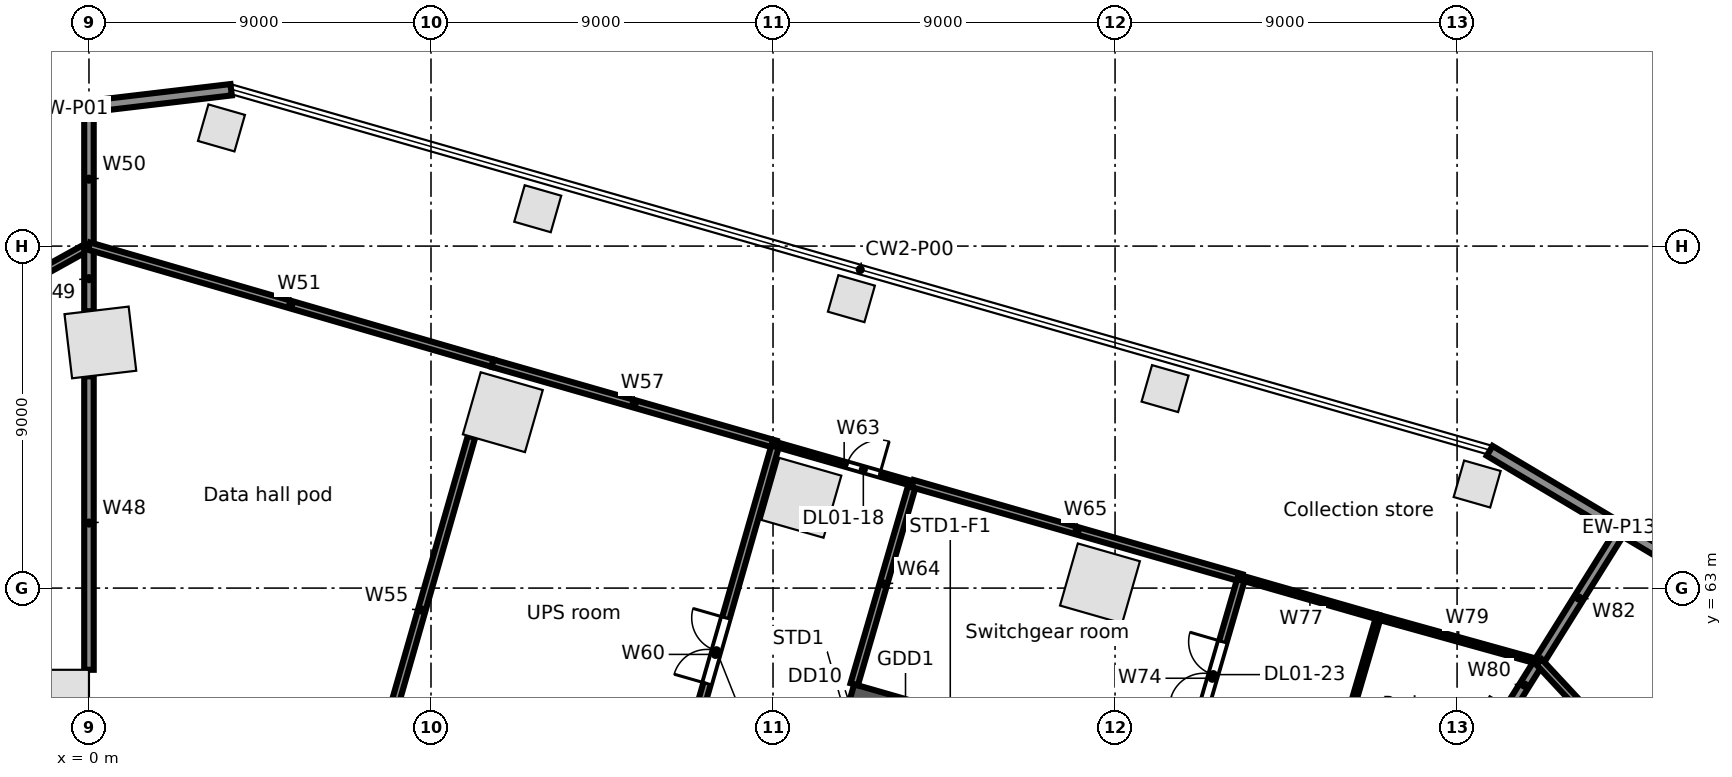
"""IFC4 building model, lengths in metres.
Left out: names, types, materials, properties, quantities, classifications, styles, units other than length and angle.
Written with IfcOpenShell. Run it as: python <this file> out.ifc"""

import sys

from ifc_helpers import new_model, si_unit, direction, frame, frame_2d, origin, origin_2d, place, context, subcontext, project, spatial, rectangle, extrude, element, fill, save


model = new_model("IFC4")
c1 = context("Model", 3, precision=1e-05, world=origin(), true_north=direction((0.0, 1.0)))
c2 = subcontext(c1, "Body", "Model", "MODEL_VIEW")
j1 = project(units=[si_unit("LENGTHUNIT", "METRE"), si_unit("PLANEANGLEUNIT", "RADIAN")], contexts=[c1])
p1 = place(None, origin())
s1 = spatial("IfcSite", under=j1, at=p1, CompositionType="ELEMENT")
p2 = place(p1, origin())
s2 = spatial("IfcBuilding", under=s1, at=p2, CompositionType="ELEMENT")
p3 = place(p2, frame((0.0, 0.0, 11.5)))
s3 = spatial("IfcBuildingStorey", under=s2, at=p3, CompositionType="ELEMENT", Elevation=11.5)
p4 = place(p3, frame((37.085, 59.262, 0.0), z_axis=(0.0, 0.0, 1.0), x_axis=(-0.859406411501, 0.511293086077, 0.0)))
e1 = element("IfcColumn", 1, at=p4, inside=s3, PredefinedType="COLUMN", context=c2, shape_type="SweptSolid", body=[
    extrude(rectangle(XDim=1.3, YDim=1.3, at=origin_2d()), origin(), (0.0, 0.0, 1.0), 5.0),
])
for number, where, z_axis, x_axis in (
    (2, (26.603, 63.124, 0.0), (0.0, 0.0, 1.0), (-0.961, 0.276, 0.0)),
    (3, (18.746, 65.376, 0.0), (0.0, 0.0, 1.0), (-0.961, 0.276, 0.0)),
    (4, (10.89, 67.629, 0.0), (0.0, 0.0, 1.0), (-0.961, 0.276, 0.0)),
    (5, (0.3, 69.464, 0.0), (0.0, 0.0, 1.0), (-0.993, -0.118, 0.0)),
    (6, (-0.85, 60.0, 0.0), (0.0, 0.0, 1.0), (0.0, 1.0, 0.0)),
):
    element("IfcColumn", number, at=place(p3, frame(where, z_axis=z_axis, x_axis=x_axis)), inside=s3, PredefinedType="COLUMN", context=c2, shape_type="SweptSolid", body=[
        extrude(rectangle(XDim=1.7, YDim=1.7, at=origin_2d()), origin(), (0.0, 0.0, 1.0), 5.0),
    ])
for number, where, z_axis, x_axis in (
    (7, (36.528, 65.739, 0.0), (0.0, 0.0, 1.0), (-0.961, 0.276, 0.0)),
    (8, (28.316, 68.25, 0.0), (0.0, 0.0, 1.0), (-0.961, 0.276, 0.0)),
    (9, (20.062, 70.616, 0.0), (0.0, 0.0, 1.0), (-0.961, 0.276, 0.0)),
    (10, (11.809, 72.983, 0.0), (0.0, 0.0, 1.0), (-0.961, 0.276, 0.0)),
    (11, (3.486, 75.11, 0.0), (0.0, 0.0, 1.0), (-0.961, 0.276, 0.0)),
):
    element("IfcColumn", number, at=place(p3, frame(where, z_axis=z_axis, x_axis=x_axis)), inside=s3, PredefinedType="COLUMN", context=c2, shape_type="SweptSolid", body=[
        extrude(rectangle(XDim=1.0, YDim=1.0, at=origin_2d()), origin(), (0.0, 0.0, 1.0), 5.0),
    ])
p5 = place(p3, frame((-4.663, 75.12, 0.0), z_axis=(0.0, 0.0, 1.0), x_axis=(0.993069631717, 0.11752747152, 0.0)))
e12 = element("IfcWall", 12, at=p5, inside=s3, PredefinedType="STANDARD", context=c2, shape_type="SweptSolid", body=[
    extrude(rectangle(XDim=8.463, YDim=0.3, at=frame_2d((4.231, 0.0))), origin(), (0.0, 0.0, 1.0), 4.65),
])
p6 = place(p3, frame((36.858, 66.612, 0.0), z_axis=(0.0, 0.0, 1.0), x_axis=(0.85940790562, -0.51129057468, 0.0)))
e13 = element("IfcWall", 13, at=p6, inside=s3, PredefinedType="STANDARD", context=c2, shape_type="SweptSolid", body=[
    extrude(rectangle(XDim=7.906, YDim=0.3, at=frame_2d((3.953, 0.0))), origin(), (0.0, 0.0, 1.0), 4.65),
])
p7 = place(p3, frame((20.053, 60.18, 0.0), z_axis=(0.0, 0.0, 1.0), x_axis=(0.96126248289, -0.275634611374, 0.0)))
e14 = element("IfcWall", 14, at=p7, inside=s3, PredefinedType="SOLIDWALL", context=c2, shape_type="SweptSolid", body=[
    extrude(rectangle(XDim=9.0, YDim=0.6, at=frame_2d((4.5, 0.0))), origin(), (0.0, 0.0, 1.0), 4.65),
])
p8 = place(p3, frame((-6.337, 68.478, 0.0), z_axis=(0.0, 0.0, 1.0), x_axis=(0.87407148623, 0.485797320864, 0.0)))
e15 = element("IfcWall", 15, at=p8, inside=s3, PredefinedType="PARTITIONING", context=c2, shape_type="SweptSolid", body=[
    extrude(rectangle(XDim=7.25, YDim=0.2, at=frame_2d((3.625, 0.0))), origin(), (0.0, 0.0, 1.0), 3.93),
])
p9 = place(p8, frame((2.7, 0.0, 0.0)))
e16 = element("IfcOpeningElement", 16, at=p9, cuts=e15, PredefinedType="OPENING", context=c2, shape_type="SweptSolid", body=[
    extrude(rectangle(XDim=1.8, YDim=2.1, at=frame_2d((0.9, 1.05))), frame((0.0, 0.11, 0.0), z_axis=(0.0, -1.0, 0.0), x_axis=(1.0, 0.0, 0.0)), (0.0, 0.0, 1.0), 0.22),
])
p10 = place(p3, frame((0.0, 60.85, 0.0), z_axis=(0.0, 0.0, 1.0), x_axis=(0.0, 1.0, 0.0)))
e17 = element("IfcWall", 17, at=p10, inside=s3, PredefinedType="PARTITIONING", context=c2, shape_type="SweptSolid", body=[
    extrude(rectangle(XDim=7.723, YDim=0.25, at=frame_2d((3.861, 0.0))), origin(), (0.0, 0.0, 1.0), 3.93),
])
p11 = place(p3, frame((0.0, 70.285, 0.0), z_axis=(0.0, 0.0, 1.0), x_axis=(0.0, 1.0, 0.0)))
e18 = element("IfcWall", 18, at=p11, inside=s3, PredefinedType="PARTITIONING", context=c2, shape_type="SweptSolid", body=[
    extrude(rectangle(XDim=1.715, YDim=0.25, at=frame_2d((0.857, 0.0))), origin(), (0.0, 0.0, 1.0), 4.65),
])
p12 = place(p3, frame((0.0, 72.0, 0.0), z_axis=(0.0, 0.0, 1.0), x_axis=(0.0, 1.0, 0.0)))
e19 = element("IfcWall", 19, at=p12, inside=s3, PredefinedType="PARTITIONING", context=c2, shape_type="SweptSolid", body=[
    extrude(rectangle(XDim=3.521, YDim=0.25, at=frame_2d((1.76, 0.0))), origin(), (0.0, 0.0, 1.0), 4.024),
])
p13 = place(p3, frame((0.0, 72.0, 0.0), z_axis=(0.0, 0.0, 1.0), x_axis=(0.960375968852, -0.278707729443, 0.0)))
e20 = element("IfcWall", 20, at=p13, inside=s3, PredefinedType="PARTITIONING", context=c2, shape_type="SweptSolid", body=[
    extrude(rectangle(XDim=11.058, YDim=0.2, at=frame_2d((5.529, 0.0))), origin(), (0.0, 0.0, 1.0), 3.712),
])
p14 = place(p3, frame((7.45, 57.864, 0.0), z_axis=(0.0, 0.0, 1.0), x_axis=(0.275710305557, 0.961240774941, 0.0)))
e21 = element("IfcWall", 21, at=p14, inside=s3, PredefinedType="PARTITIONING", context=c2, shape_type="SweptSolid", body=[
    extrude(rectangle(XDim=9.485, YDim=0.2, at=frame_2d((4.742, 0.0))), origin(), (0.0, 0.0, 1.0), 3.712),
])
p15 = place(p3, frame((10.62, 68.918, 0.0), z_axis=(0.0, 0.0, 1.0), x_axis=(0.961260764876, -0.275640602796, 0.0)))
e22 = element("IfcWall", 22, at=p15, inside=s3, PredefinedType="PARTITIONING", context=c2, shape_type="SweptSolid", body=[
    extrude(rectangle(XDim=7.749, YDim=0.2, at=frame_2d((3.875, 0.0))), origin(), (0.0, 0.0, 1.0), 3.712),
])
p16 = place(p3, frame((14.9, 55.728, 0.0), z_axis=(0.0, 0.0, 1.0), x_axis=(0.27559869205, 0.961272781754, 0.0)))
e23 = element("IfcWall", 23, at=p16, inside=s3, PredefinedType="PARTITIONING", context=c2, shape_type="SweptSolid", body=[
    extrude(rectangle(XDim=11.499, YDim=0.2, at=frame_2d((5.75, 0.0))), origin(), (0.0, 0.0, 1.0), 3.712),
])
p17 = place(p16, frame((4.95, 0.0, 0.0)))
e24 = element("IfcOpeningElement", 24, at=p17, cuts=e23, PredefinedType="OPENING", context=c2, shape_type="SweptSolid", body=[
    extrude(rectangle(XDim=1.8, YDim=2.1, at=frame_2d((0.9, 1.05))), frame((0.0, 0.11, 0.0), z_axis=(0.0, -1.0, 0.0), x_axis=(1.0, 0.0, 0.0)), (0.0, 0.0, 1.0), 0.22),
])
p18 = place(p3, frame((18.069, 66.782, 0.0), z_axis=(0.0, 0.0, 1.0), x_axis=(0.961314848061, -0.275451924837, 0.0)))
e25 = element("IfcWall", 25, at=p18, inside=s3, PredefinedType="PARTITIONING", context=c2, shape_type="SweptSolid", body=[
    extrude(rectangle(XDim=3.75, YDim=0.125, at=frame_2d((1.875, 0.0))), origin(), (0.0, 0.0, 1.0), 3.712),
])
p19 = place(p18, frame((1.95, 0.0, 0.0)))
e26 = element("IfcOpeningElement", 26, at=p19, cuts=e25, PredefinedType="OPENING", context=c2, shape_type="SweptSolid", body=[
    extrude(rectangle(XDim=0.9, YDim=2.1, at=frame_2d((0.45, 1.05))), frame((0.0, 0.073, 0.0), z_axis=(0.0, -1.0, 0.0), x_axis=(1.0, 0.0, 0.0)), (0.0, 0.0, 1.0), 0.145),
])
p20 = place(p3, frame((20.136, 60.468, 0.0), z_axis=(0.0, 0.0, 1.0), x_axis=(0.279630121779, 0.96010780384, 0.0)))
e27 = element("IfcWall", 27, at=p20, inside=s3, PredefinedType="PARTITIONING", context=c2, shape_type="SweptSolid", body=[
    extrude(rectangle(XDim=5.5, YDim=0.2, at=frame_2d((2.75, 0.0))), origin(), (0.0, 0.0, 1.0), 4.018),
])
p21 = place(p3, frame((21.674, 65.749, 0.0), z_axis=(0.0, 0.0, 1.0), x_axis=(0.961259417468, -0.275645301662, 0.0)))
e28 = element("IfcWall", 28, at=p21, inside=s3, PredefinedType="PARTITIONING", context=c2, shape_type="SweptSolid", body=[
    extrude(rectangle(XDim=9.0, YDim=0.2, at=frame_2d((4.5, 0.0))), origin(), (0.0, 0.0, 1.0), 3.822),
])
p22 = place(p3, frame((28.787, 57.987, 0.0), z_axis=(0.0, 0.0, 1.0), x_axis=(0.279752860161, 0.960072047938, 0.0)))
e29 = element("IfcWall", 29, at=p22, inside=s3, PredefinedType="PARTITIONING", context=c2, shape_type="SweptSolid", body=[
    extrude(rectangle(XDim=5.501, YDim=0.2, at=frame_2d((2.75, 0.0))), origin(), (0.0, 0.0, 1.0), 3.922),
])
p23 = place(p22, frame((1.95, 0.0, 0.0)))
e30 = element("IfcOpeningElement", 30, at=p23, cuts=e29, PredefinedType="OPENING", context=c2, shape_type="SweptSolid", body=[
    extrude(rectangle(XDim=1.8, YDim=2.1, at=frame_2d((0.9, 1.05))), frame((0.0, 0.11, 0.0), z_axis=(0.0, -1.0, 0.0), x_axis=(1.0, 0.0, 0.0)), (0.0, 0.0, 1.0), 0.22),
])
p24 = place(p3, frame((30.326, 63.268, 0.0), z_axis=(0.0, 0.0, 1.0), x_axis=(0.96120880595, -0.275821738383, 0.0)))
e31 = element("IfcWall", 31, at=p24, inside=s3, PredefinedType="PARTITIONING", context=c2, shape_type="SweptSolid", body=[
    extrude(rectangle(XDim=3.75, YDim=0.125, at=frame_2d((1.875, 0.0))), origin(), (0.0, 0.0, 1.0), 4.65),
])
p25 = place(p3, frame((31.034, 52.361, 0.0), z_axis=(0.0, 0.0, 1.0), x_axis=(0.281471237406, 0.959569665273, 0.0)))
e32 = element("IfcWall", 32, at=p25, inside=s3, PredefinedType="PARTITIONING", context=c2, shape_type="SweptSolid", body=[
    extrude(rectangle(XDim=10.289, YDim=0.125, at=frame_2d((5.145, 0.0))), origin(), (0.0, 0.0, 1.0), 3.922),
])
p26 = place(p25, frame((4.7, 0.0, 0.0)))
e33 = element("IfcOpeningElement", 33, at=p26, cuts=e32, PredefinedType="OPENING", context=c2, shape_type="SweptSolid", body=[
    extrude(rectangle(XDim=0.9, YDim=2.1, at=frame_2d((0.45, 1.05))), frame((0.0, 0.073, 0.0), z_axis=(0.0, -1.0, 0.0), x_axis=(1.0, 0.0, 0.0)), (0.0, 0.0, 1.0), 0.145),
])
p27 = place(p3, frame((33.93, 62.234, 0.0), z_axis=(0.0, 0.0, 1.0), x_axis=(0.963433299433, -0.267948274007, 0.0)))
e34 = element("IfcWall", 34, at=p27, inside=s3, PredefinedType="PARTITIONING", context=c2, shape_type="SweptSolid", body=[
    extrude(rectangle(XDim=4.385, YDim=0.125, at=frame_2d((2.192, 0.0))), origin(), (0.0, 0.0, 1.0), 4.018),
])
p28 = place(p3, frame((37.39, 59.837, 0.0), z_axis=(0.0, 0.0, 1.0), x_axis=(0.530151180786, 0.84790313451, 0.0)))
e35 = element("IfcWall", 35, at=p28, inside=s3, PredefinedType="PARTITIONING", context=c2, shape_type="SweptSolid", body=[
    extrude(rectangle(XDim=1.441, YDim=0.25, at=frame_2d((0.721, 0.0))), origin(), (0.0, 0.0, 1.0), 4.65),
])
p29 = place(p3, frame((38.154, 61.059, 0.0), z_axis=(0.0, 0.0, 1.0), x_axis=(0.529921368013, 0.848046781565, 0.0)))
e36 = element("IfcWall", 36, at=p29, inside=s3, PredefinedType="PARTITIONING", context=c2, shape_type="SweptSolid", body=[
    extrude(rectangle(XDim=3.961, YDim=0.25, at=frame_2d((1.98, 0.0))), origin(), (0.0, 0.0, 1.0), 4.024),
])
p30 = place(p3, frame((38.154, 61.059, 0.0), z_axis=(0.0, 0.0, 1.0), x_axis=(0.681663875787, -0.731665470312, 0.0)))
e37 = element("IfcWall", 37, at=p30, inside=s3, PredefinedType="PARTITIONING", context=c2, shape_type="SweptSolid", body=[
    extrude(rectangle(XDim=6.303, YDim=0.2, at=frame_2d((3.152, 0.0))), origin(), (0.0, 0.0, 1.0), 4.018),
])
p31 = place(p19, origin())
e38 = element("IfcDoor", 38, at=p31, inside=s3, OperationType="SINGLE_SWING_RIGHT", PredefinedType="DOOR", context=c2, shape_type="SweptSolid", body=[
    extrude(rectangle(XDim=0.9, YDim=2.1, at=frame_2d((0.45, 1.05))), frame((0.0, 0.025, 0.0), z_axis=(0.0, -1.0, 0.0), x_axis=(1.0, 0.0, 0.0)), (0.0, 0.0, 1.0), 0.05),
])
fill(e26, e38)
p32 = place(p17, origin())
e39 = element("IfcDoor", 39, at=p32, inside=s3, OperationType="DOUBLE_DOOR_SINGLE_SWING", PredefinedType="DOOR", context=c2, shape_type="SweptSolid", body=[
    extrude(rectangle(XDim=1.8, YDim=2.1, at=frame_2d((0.9, 1.05))), frame((0.0, 0.025, 0.0), z_axis=(0.0, -1.0, 0.0), x_axis=(1.0, 0.0, 0.0)), (0.0, 0.0, 1.0), 0.05),
])
fill(e24, e39)
p33 = place(p23, origin())
e40 = element("IfcDoor", 40, at=p33, inside=s3, OperationType="DOUBLE_DOOR_SINGLE_SWING", PredefinedType="DOOR", context=c2, shape_type="SweptSolid", body=[
    extrude(rectangle(XDim=1.8, YDim=2.1, at=frame_2d((0.9, 1.05))), frame((0.0, 0.025, 0.0), z_axis=(0.0, -1.0, 0.0), x_axis=(1.0, 0.0, 0.0)), (0.0, 0.0, 1.0), 0.05),
])
fill(e30, e40)
save(model, sys.argv[1])
